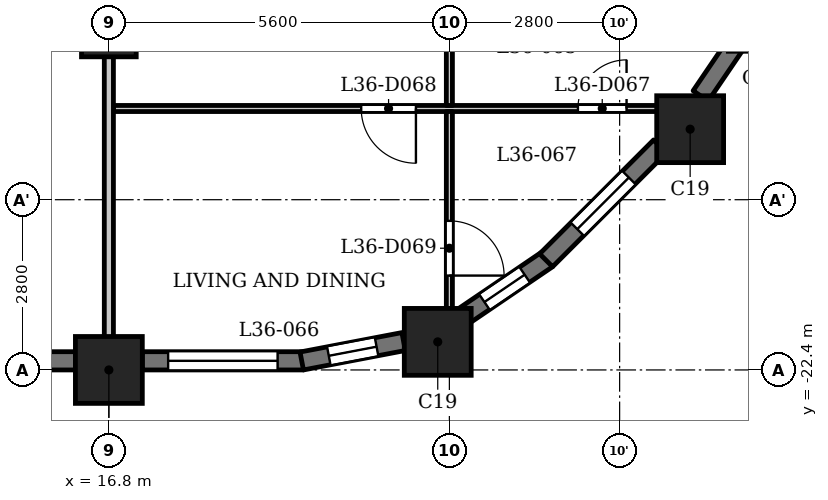
"""IFC4 building model, lengths in metres.
Left out: names, types, materials, properties, quantities, classifications, styles, units other than length and angle.
Written with IfcOpenShell. Run it as: python <this file> out.ifc"""

import sys

from ifc_helpers import new_model, si_unit, direction, frame, frame_2d, origin, origin_2d, place, context, subcontext, project, spatial, rectangle, extrude, element, fill, save


model = new_model("IFC4")
c1 = context("Model", 3, precision=1e-05, world=origin(), true_north=direction((0.0, 1.0)))
c2 = subcontext(c1, "Body", "Model", "MODEL_VIEW")
j1 = project(units=[si_unit("LENGTHUNIT", "METRE"), si_unit("PLANEANGLEUNIT", "RADIAN")], contexts=[c1])
p1 = place(None, origin())
s1 = spatial("IfcSite", under=j1, at=p1, CompositionType="ELEMENT")
p2 = place(p1, origin())
s2 = spatial("IfcBuilding", under=s1, at=p2, CompositionType="ELEMENT")
p3 = place(p2, frame((0.0, 0.0, 143.1)))
s3 = spatial("IfcBuildingStorey", under=s2, at=p3, CompositionType="ELEMENT", Elevation=143.1)
for number, where, z_axis, x_axis in (
    (1, (16.8, -22.4, 0.0), (0.0, 0.0, 1.0), (1.0, 0.0, 0.0)),
    (2, (22.209, -21.938, 0.0), (0.0, 0.0, 1.0), (1.0, 0.0, 0.0)),
    (3, (26.36, -18.44, 0.0), (0.0, 0.0, 1.0), (1.0, 0.0, 0.0)),
):
    element("IfcColumn", number, at=place(p3, frame(where, z_axis=z_axis, x_axis=x_axis)), inside=s3, PredefinedType="COLUMN", context=c2, shape_type="SweptSolid", body=[
        extrude(rectangle(XDim=1.1, YDim=1.1, at=origin_2d()), origin(), (0.0, 0.0, 1.0), 3.5),
    ])
p4 = place(p3, frame((16.8, -16.8, 0.0), z_axis=(0.0, 0.0, 1.0), x_axis=(1.0, 0.0, 0.0)))
e4 = element("IfcColumn", 4, at=p4, inside=s3, PredefinedType="COLUMN", context=c2, shape_type="SweptSolid", body=[
    extrude(rectangle(XDim=0.9, YDim=0.9, at=origin_2d()), origin(), (0.0, 0.0, 1.0), 3.5),
])
p5 = place(p3, frame((11.75, -22.25, 0.0), z_axis=(0.0, 0.0, 1.0), x_axis=(1.0, 0.0, 0.0)))
e5 = element("IfcWall", 5, at=p5, inside=s3, PredefinedType="SOLIDWALL", context=c2, shape_type="SweptSolid", body=[
    extrude(rectangle(XDim=4.5, YDim=0.3, at=frame_2d((2.25, 0.0))), origin(), (0.0, 0.0, 1.0), 2.45),
])
p6 = place(p5, frame((0.45, 0.0, 1.2)))
e6 = element("IfcOpeningElement", 6, at=p6, cuts=e5, PredefinedType="OPENING", context=c2, shape_type="SweptSolid", body=[
    extrude(rectangle(XDim=3.6, YDim=0.95, at=frame_2d((1.8, 0.475))), frame((0.0, 0.16, 0.0), z_axis=(0.0, -1.0, 0.0), x_axis=(1.0, 0.0, 0.0)), (0.0, 0.0, 1.0), 0.32),
])
p7 = place(p3, frame((17.35, -22.25, 0.0), z_axis=(0.0, 0.0, 1.0), x_axis=(1.0, 0.0, 0.0)))
e7 = element("IfcWall", 7, at=p7, inside=s3, PredefinedType="SOLIDWALL", context=c2, shape_type="SweptSolid", body=[
    extrude(rectangle(XDim=2.65, YDim=0.3, at=frame_2d((1.325, 0.0))), origin(), (0.0, 0.0, 1.0), 2.45),
])
p8 = place(p7, frame((0.425, 0.0, 0.9)))
e8 = element("IfcOpeningElement", 8, at=p8, cuts=e7, PredefinedType="OPENING", context=c2, shape_type="SweptSolid", body=[
    extrude(rectangle(XDim=1.8, YDim=1.25, at=frame_2d((0.9, 0.625))), frame((0.0, 0.16, 0.0), z_axis=(0.0, -1.0, 0.0), x_axis=(1.0, 0.0, 0.0)), (0.0, 0.0, 1.0), 0.32),
])
p9 = place(p3, frame((19.972, -22.253, 0.0), z_axis=(0.0, 0.0, 1.0), x_axis=(0.982297206936, 0.187329114784, 0.0)))
e9 = element("IfcWall", 9, at=p9, inside=s3, PredefinedType="SOLIDWALL", context=c2, shape_type="SweptSolid", body=[
    extrude(rectangle(XDim=1.706, YDim=0.3, at=frame_2d((0.853, 0.0))), origin(), (0.0, 0.0, 1.0), 2.45),
])
p10 = place(p9, frame((0.453, 0.0, 0.6)))
e10 = element("IfcOpeningElement", 10, at=p10, cuts=e9, PredefinedType="OPENING", context=c2, shape_type="SweptSolid", body=[
    extrude(rectangle(XDim=0.8, YDim=1.55, at=frame_2d((0.4, 0.775))), frame((0.0, 0.16, 0.0), z_axis=(0.0, -1.0, 0.0), x_axis=(1.0, 0.0, 0.0)), (0.0, 0.0, 1.0), 0.32),
])
p11 = place(p3, frame((22.602, -21.538, 0.0), z_axis=(0.0, 0.0, 1.0), x_axis=(0.827040942766, 0.562141689424, 0.0)))
e11 = element("IfcWall", 11, at=p11, inside=s3, PredefinedType="SOLIDWALL", context=c2, shape_type="SweptSolid", body=[
    extrude(rectangle(XDim=1.706, YDim=0.3, at=frame_2d((0.853, 0.0))), origin(), (0.0, 0.0, 1.0), 2.45),
])
p12 = place(p11, frame((0.453, 0.0, 0.6)))
e12 = element("IfcOpeningElement", 12, at=p12, cuts=e11, PredefinedType="OPENING", context=c2, shape_type="SweptSolid", body=[
    extrude(rectangle(XDim=0.8, YDim=1.55, at=frame_2d((0.4, 0.775))), frame((0.0, 0.16, 0.0), z_axis=(0.0, -1.0, 0.0), x_axis=(1.0, 0.0, 0.0)), (0.0, 0.0, 1.0), 0.32),
])
p13 = place(p3, frame((23.991, -20.597, 0.0), z_axis=(0.0, 0.0, 1.0), x_axis=(0.707106781187, 0.707106781187, 0.0)))
e13 = element("IfcWall", 13, at=p13, inside=s3, PredefinedType="SOLIDWALL", context=c2, shape_type="SweptSolid", body=[
    extrude(rectangle(XDim=2.65, YDim=0.3, at=frame_2d((1.325, 0.0))), origin(), (0.0, 0.0, 1.0), 2.45),
])
p14 = place(p13, frame((0.725, 0.0, 0.6)))
e14 = element("IfcOpeningElement", 14, at=p14, cuts=e13, PredefinedType="OPENING", context=c2, shape_type="SweptSolid", body=[
    extrude(rectangle(XDim=1.2, YDim=1.55, at=frame_2d((0.6, 0.775))), frame((0.0, 0.16, 0.0), z_axis=(0.0, -1.0, 0.0), x_axis=(1.0, 0.0, 0.0)), (0.0, 0.0, 1.0), 0.32),
])
p15 = place(p3, frame((26.532, -17.893, 0.0), z_axis=(0.0, 0.0, 1.0), x_axis=(0.562105419172, 0.82706559458, 0.0)))
e15 = element("IfcWall", 15, at=p15, inside=s3, PredefinedType="SOLIDWALL", context=c2, shape_type="SweptSolid", body=[
    extrude(rectangle(XDim=1.077, YDim=0.3, at=frame_2d((0.539, 0.0))), origin(), (0.0, 0.0, 1.0), 3.2),
])
p16 = place(p3, frame((16.875, -18.1, 0.0), z_axis=(0.0, 0.0, 1.0), x_axis=(1.0, 0.0, 0.0)))
e16 = element("IfcWall", 16, at=p16, inside=s3, PredefinedType="PARTITIONING", context=c2, shape_type="SweptSolid", body=[
    extrude(rectangle(XDim=9.565, YDim=0.1, at=frame_2d((4.782, 0.0))), origin(), (0.0, 0.0, 1.0), 3.2),
])
p17 = place(p16, frame((7.639, 0.0, 0.0)))
e17 = element("IfcOpeningElement", 17, at=p17, cuts=e16, PredefinedType="OPENING", context=c2, shape_type="SweptSolid", body=[
    extrude(rectangle(XDim=0.8, YDim=2.1, at=frame_2d((0.4, 1.05))), frame((0.0, 0.06, 0.0), z_axis=(0.0, -1.0, 0.0), x_axis=(1.0, 0.0, 0.0)), (0.0, 0.0, 1.0), 0.12),
])
p18 = place(p16, frame((4.075, 0.0, 0.0)))
e18 = element("IfcOpeningElement", 18, at=p18, cuts=e16, PredefinedType="OPENING", context=c2, shape_type="SweptSolid", body=[
    extrude(rectangle(XDim=0.9, YDim=2.1, at=frame_2d((0.45, 1.05))), frame((0.0, 0.06, 0.0), z_axis=(0.0, -1.0, 0.0), x_axis=(1.0, 0.0, 0.0)), (0.0, 0.0, 1.0), 0.12),
])
p19 = place(p3, frame((16.8, -22.93, 0.0), z_axis=(0.0, 0.0, 1.0), x_axis=(0.0, 1.0, 0.0)))
e19 = element("IfcWall", 19, at=p19, inside=s3, PredefinedType="PARTITIONING", context=c2, shape_type="SweptSolid", body=[
    extrude(rectangle(XDim=7.455, YDim=0.15, at=frame_2d((3.728, 0.0))), origin(), (0.0, 0.0, 1.0), 3.2),
])
p20 = place(p3, frame((22.4, -21.72, 0.0), z_axis=(0.0, 0.0, 1.0), x_axis=(0.0, 1.0, 0.0)))
e20 = element("IfcWall", 20, at=p20, inside=s3, PredefinedType="PARTITIONING", context=c2, shape_type="SweptSolid", body=[
    extrude(rectangle(XDim=3.57, YDim=0.1, at=frame_2d((1.785, 0.0))), origin(), (0.0, 0.0, 1.0), 3.2),
])
p21 = place(p20, frame((0.872, 0.0, 0.0)))
e21 = element("IfcOpeningElement", 21, at=p21, cuts=e20, PredefinedType="OPENING", context=c2, shape_type="SweptSolid", body=[
    extrude(rectangle(XDim=0.9, YDim=2.1, at=frame_2d((0.45, 1.05))), frame((0.0, 0.06, 0.0), z_axis=(0.0, -1.0, 0.0), x_axis=(1.0, 0.0, 0.0)), (0.0, 0.0, 1.0), 0.12),
])
p22 = place(p3, frame((22.4, -18.05, 0.0), z_axis=(0.0, 0.0, 1.0), x_axis=(0.0, 1.0, 0.0)))
e22 = element("IfcWall", 22, at=p22, inside=s3, PredefinedType="PARTITIONING", context=c2, shape_type="SweptSolid", body=[
    extrude(rectangle(XDim=2.575, YDim=0.1, at=frame_2d((1.288, 0.0))), origin(), (0.0, 0.0, 1.0), 3.2),
])
p23 = place(p17, origin())
e23 = element("IfcDoor", 23, at=p23, inside=s3, OperationType="SINGLE_SWING_LEFT", PredefinedType="DOOR", context=c2, shape_type="SweptSolid", body=[
    extrude(rectangle(XDim=0.8, YDim=2.1, at=frame_2d((0.4, 1.05))), frame((0.0, 0.025, 0.0), z_axis=(0.0, -1.0, 0.0), x_axis=(1.0, 0.0, 0.0)), (0.0, 0.0, 1.0), 0.05),
])
fill(e17, e23)
p24 = place(p18, origin())
e24 = element("IfcDoor", 24, at=p24, inside=s3, OperationType="SINGLE_SWING_RIGHT", PredefinedType="DOOR", context=c2, shape_type="SweptSolid", body=[
    extrude(rectangle(XDim=0.9, YDim=2.1, at=frame_2d((0.45, 1.05))), frame((0.0, 0.025, 0.0), z_axis=(0.0, -1.0, 0.0), x_axis=(1.0, 0.0, 0.0)), (0.0, 0.0, 1.0), 0.05),
])
fill(e18, e24)
p25 = place(p21, origin())
e25 = element("IfcDoor", 25, at=p25, inside=s3, OperationType="SINGLE_SWING_LEFT", PredefinedType="DOOR", context=c2, shape_type="SweptSolid", body=[
    extrude(rectangle(XDim=0.9, YDim=2.1, at=frame_2d((0.45, 1.05))), frame((0.0, 0.025, 0.0), z_axis=(0.0, -1.0, 0.0), x_axis=(1.0, 0.0, 0.0)), (0.0, 0.0, 1.0), 0.05),
])
fill(e21, e25)
p26 = place(p8, origin())
e26 = element("IfcWindow", 26, at=p26, inside=s3, PartitioningType="SINGLE_PANEL", PredefinedType="WINDOW", context=c2, shape_type="SweptSolid", body=[
    extrude(rectangle(XDim=1.8, YDim=1.25, at=frame_2d((0.9, 0.625))), frame((0.0, 0.03, 0.0), z_axis=(0.0, -1.0, 0.0), x_axis=(1.0, 0.0, 0.0)), (0.0, 0.0, 1.0), 0.06),
])
fill(e8, e26)
p27 = place(p10, origin())
e27 = element("IfcWindow", 27, at=p27, inside=s3, PartitioningType="SINGLE_PANEL", PredefinedType="WINDOW", context=c2, shape_type="SweptSolid", body=[
    extrude(rectangle(XDim=0.8, YDim=1.55, at=frame_2d((0.4, 0.775))), frame((0.0, 0.03, 0.0), z_axis=(0.0, -1.0, 0.0), x_axis=(1.0, 0.0, 0.0)), (0.0, 0.0, 1.0), 0.06),
])
fill(e10, e27)
p28 = place(p12, origin())
e28 = element("IfcWindow", 28, at=p28, inside=s3, PartitioningType="SINGLE_PANEL", PredefinedType="WINDOW", context=c2, shape_type="SweptSolid", body=[
    extrude(rectangle(XDim=0.8, YDim=1.55, at=frame_2d((0.4, 0.775))), frame((0.0, 0.03, 0.0), z_axis=(0.0, -1.0, 0.0), x_axis=(1.0, 0.0, 0.0)), (0.0, 0.0, 1.0), 0.06),
])
fill(e12, e28)
p29 = place(p14, origin())
e29 = element("IfcWindow", 29, at=p29, inside=s3, PartitioningType="SINGLE_PANEL", PredefinedType="WINDOW", context=c2, shape_type="SweptSolid", body=[
    extrude(rectangle(XDim=1.2, YDim=1.55, at=frame_2d((0.6, 0.775))), frame((0.0, 0.03, 0.0), z_axis=(0.0, -1.0, 0.0), x_axis=(1.0, 0.0, 0.0)), (0.0, 0.0, 1.0), 0.06),
])
fill(e14, e29)
save(model, sys.argv[1])
